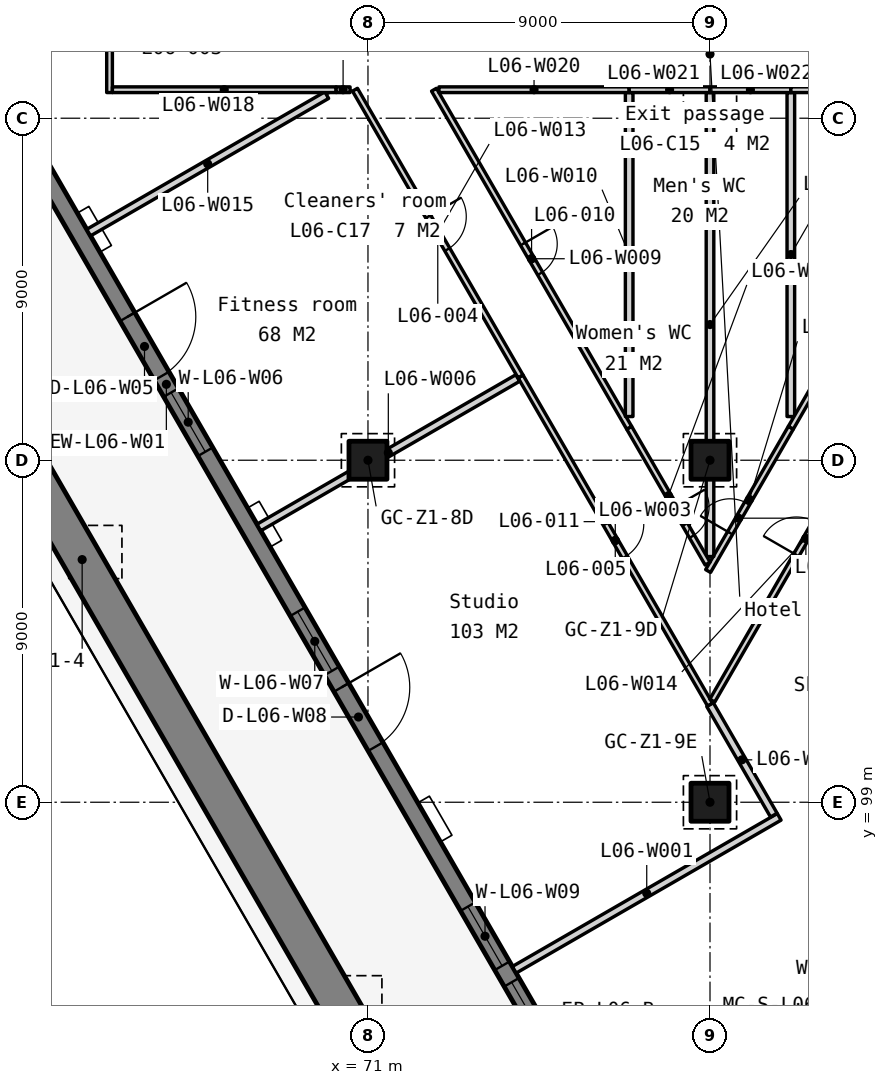
"""IFC4 building model, lengths in metres.
Left out: names, types, materials, properties, quantities, classifications, styles, units other than length and angle.
Written with IfcOpenShell. Run it as: python <this file> out.ifc"""

import sys

from ifc_helpers import new_model, si_unit, direction, frame, frame_2d, origin, origin_2d, place, context, subcontext, project, spatial, polyline, rectangle, outline, extrude, element, fill, save


model = new_model("IFC4")
c1 = context("Model", 3, precision=1e-05, world=origin(), true_north=direction((0.0, 1.0)))
c2 = subcontext(c1, "Body", "Model", "MODEL_VIEW")
j1 = project(units=[si_unit("LENGTHUNIT", "METRE"), si_unit("PLANEANGLEUNIT", "RADIAN")], contexts=[c1])
p1 = place(None, origin())
s1 = spatial("IfcSite", under=j1, at=p1, CompositionType="ELEMENT")
p2 = place(p1, origin())
s2 = spatial("IfcBuilding", under=s1, at=p2, CompositionType="ELEMENT")
p3 = place(p2, frame((0.0, 0.0, 35.0)))
s3 = spatial("IfcBuildingStorey", under=s2, at=p3, CompositionType="ELEMENT", Elevation=35.0)
for number, where, z_axis, x_axis in (
    (1, (71.0, 108.0, 0.0), (0.0, 0.0, 1.0), (1.0, 0.0, 0.0)),
    (2, (80.0, 99.0, 0.0), (0.0, 0.0, 1.0), (1.0, 0.0, 0.0)),
    (3, (80.0, 108.0, 0.0), (0.0, 0.0, 1.0), (1.0, 0.0, 0.0)),
):
    element("IfcColumn", number, at=place(p3, frame(where, z_axis=z_axis, x_axis=x_axis)), inside=s3, PredefinedType="COLUMN", context=c2, shape_type="SweptSolid", body=[
        extrude(rectangle(XDim=1.0, YDim=1.0, at=origin_2d()), origin(), (0.0, 0.0, 1.0), 3.5),
    ])
p4 = place(p3, frame((54.495, 129.397, -0.2), z_axis=(0.0, 0.0, 1.0), x_axis=(0.499999201451, -0.866025864826, 0.0)))
e4 = element("IfcWall", 4, at=p4, inside=s3, PredefinedType="SOLIDWALL", context=c2, shape_type="SweptSolid", body=[
    extrude(outline(polyline([(44.8, 0.0), (44.8, 3.55), (0.0, 3.55), (0.0, 0.0), (44.8, 0.0)])), frame((0.0, 0.225, 0.0), z_axis=(0.0, -1.0, 0.0), x_axis=(1.0, 0.0, 0.0)), (0.0, 0.0, 1.0), 0.45),
])
p5 = place(p4, frame((2.43, 0.0, 1.1)))
e5 = element("IfcOpeningElement", 5, at=p5, cuts=e4, PredefinedType="OPENING", context=c2, shape_type="SweptSolid", body=[
    extrude(rectangle(XDim=1.8, YDim=1.5, at=frame_2d((0.9, 0.75))), frame((0.0, 0.235, 0.0), z_axis=(0.0, -1.0, 0.0), x_axis=(1.0, 0.0, 0.0)), (0.0, 0.0, 1.0), 0.47),
])
p6 = place(p4, frame((4.73, 0.0, 0.2)))
e6 = element("IfcOpeningElement", 6, at=p6, cuts=e4, PredefinedType="OPENING", context=c2, shape_type="SweptSolid", body=[
    extrude(rectangle(XDim=1.8, YDim=2.4, at=frame_2d((0.9, 1.2))), frame((0.0, 0.235, 0.0), z_axis=(0.0, -1.0, 0.0), x_axis=(1.0, 0.0, 0.0)), (0.0, 0.0, 1.0), 0.47),
])
p7 = place(p4, frame((11.39, 0.0, 1.1)))
e7 = element("IfcOpeningElement", 7, at=p7, cuts=e4, PredefinedType="OPENING", context=c2, shape_type="SweptSolid", body=[
    extrude(rectangle(XDim=1.8, YDim=1.5, at=frame_2d((0.9, 0.75))), frame((0.0, 0.235, 0.0), z_axis=(0.0, -1.0, 0.0), x_axis=(1.0, 0.0, 0.0)), (0.0, 0.0, 1.0), 0.47),
])
p8 = place(p4, frame((13.69, 0.0, 1.1)))
e8 = element("IfcOpeningElement", 8, at=p8, cuts=e4, PredefinedType="OPENING", context=c2, shape_type="SweptSolid", body=[
    extrude(rectangle(XDim=1.8, YDim=1.5, at=frame_2d((0.9, 0.75))), frame((0.0, 0.235, 0.0), z_axis=(0.0, -1.0, 0.0), x_axis=(1.0, 0.0, 0.0)), (0.0, 0.0, 1.0), 0.47),
])
p9 = place(p4, frame((20.35, 0.0, 0.2)))
e9 = element("IfcOpeningElement", 9, at=p9, cuts=e4, PredefinedType="OPENING", context=c2, shape_type="SweptSolid", body=[
    extrude(rectangle(XDim=1.8, YDim=2.4, at=frame_2d((0.9, 1.2))), frame((0.0, 0.235, 0.0), z_axis=(0.0, -1.0, 0.0), x_axis=(1.0, 0.0, 0.0)), (0.0, 0.0, 1.0), 0.47),
])
p10 = place(p4, frame((22.65, 0.0, 1.1)))
e10 = element("IfcOpeningElement", 10, at=p10, cuts=e4, PredefinedType="OPENING", context=c2, shape_type="SweptSolid", body=[
    extrude(rectangle(XDim=1.8, YDim=1.5, at=frame_2d((0.9, 0.75))), frame((0.0, 0.235, 0.0), z_axis=(0.0, -1.0, 0.0), x_axis=(1.0, 0.0, 0.0)), (0.0, 0.0, 1.0), 0.47),
])
p11 = place(p4, frame((29.31, 0.0, 1.1)))
e11 = element("IfcOpeningElement", 11, at=p11, cuts=e4, PredefinedType="OPENING", context=c2, shape_type="SweptSolid", body=[
    extrude(rectangle(XDim=1.8, YDim=1.5, at=frame_2d((0.9, 0.75))), frame((0.0, 0.235, 0.0), z_axis=(0.0, -1.0, 0.0), x_axis=(1.0, 0.0, 0.0)), (0.0, 0.0, 1.0), 0.47),
])
p12 = place(p4, frame((31.61, 0.0, 0.2)))
e12 = element("IfcOpeningElement", 12, at=p12, cuts=e4, PredefinedType="OPENING", context=c2, shape_type="SweptSolid", body=[
    extrude(rectangle(XDim=1.8, YDim=2.4, at=frame_2d((0.9, 1.2))), frame((0.0, 0.235, 0.0), z_axis=(0.0, -1.0, 0.0), x_axis=(1.0, 0.0, 0.0)), (0.0, 0.0, 1.0), 0.47),
])
p13 = place(p4, frame((38.27, 0.0, 1.1)))
e13 = element("IfcOpeningElement", 13, at=p13, cuts=e4, PredefinedType="OPENING", context=c2, shape_type="SweptSolid", body=[
    extrude(rectangle(XDim=1.8, YDim=1.5, at=frame_2d((0.9, 0.75))), frame((0.0, 0.235, 0.0), z_axis=(0.0, -1.0, 0.0), x_axis=(1.0, 0.0, 0.0)), (0.0, 0.0, 1.0), 0.47),
])
p14 = place(p4, frame((40.57, 0.0, 1.1)))
e14 = element("IfcOpeningElement", 14, at=p14, cuts=e4, PredefinedType="OPENING", context=c2, shape_type="SweptSolid", body=[
    extrude(rectangle(XDim=1.8, YDim=1.5, at=frame_2d((0.9, 0.75))), frame((0.0, 0.235, 0.0), z_axis=(0.0, -1.0, 0.0), x_axis=(1.0, 0.0, 0.0)), (0.0, 0.0, 1.0), 0.47),
])
for number, where, z_axis, x_axis in (
    (15, (110.208, 129.091, 0.0), (0.0, 0.0, 1.0), (-0.5, -0.866, 0.0)),
    (16, (77.166, 81.679, 0.0), (0.0, 0.0, 1.0), (-0.5, 0.866, 0.0)),
):
    element("IfcWall", number, at=place(p3, frame(where, z_axis=z_axis, x_axis=x_axis)), inside=s3, PredefinedType="STANDARD", context=c2, shape_type="SweptSolid", body=[
        extrude(rectangle(XDim=54.747, YDim=1.0, at=frame_2d((27.374, 0.0))), origin(), (0.0, 0.0, 1.0), 0.6),
    ])
p15 = place(p3, frame((74.85, 94.591, 0.0), z_axis=(0.0, 0.0, 1.0), x_axis=(0.866034066097, 0.499984996134, 0.0)))
e17 = element("IfcWall", 17, at=p15, inside=s3, PredefinedType="PARTITIONING", context=c2, shape_type="SweptSolid", body=[
    extrude(rectangle(XDim=8.05, YDim=0.2, at=frame_2d((4.025, 0.0))), origin(), (0.0, 0.0, 1.0), 3.35),
])
p16 = place(p3, frame((80.0, 101.571, 0.0), z_axis=(0.0, 0.0, 1.0), x_axis=(0.499875544254, -0.86609724642, 0.0)))
e18 = element("IfcWall", 18, at=p16, inside=s3, PredefinedType="PARTITIONING", context=c2, shape_type="SweptSolid", body=[
    extrude(rectangle(XDim=3.359, YDim=0.2, at=frame_2d((1.68, 0.0))), origin(), (0.0, 0.0, 1.0), 3.35),
])
p17 = place(p3, frame((75.015, 110.206, 0.0), z_axis=(0.0, 0.0, 1.0), x_axis=(0.49999446006, -0.866028602246, 0.0)))
e19 = element("IfcWall", 19, at=p17, inside=s3, PredefinedType="PARTITIONING", context=c2, shape_type="SweptSolid", body=[
    extrude(rectangle(XDim=9.971, YDim=0.15, at=frame_2d((4.985, 0.0))), origin(), (0.0, 0.0, 1.0), 3.35),
])
p18 = place(p17, frame((4.485, 0.0, 0.0)))
e20 = element("IfcOpeningElement", 20, at=p18, cuts=e19, PredefinedType="OPENING", context=c2, shape_type="SweptSolid", body=[
    extrude(rectangle(XDim=1.0, YDim=2.1, at=frame_2d((0.5, 1.05))), frame((0.0, 0.085, 0.0), z_axis=(0.0, -1.0, 0.0), x_axis=(1.0, 0.0, 0.0)), (0.0, 0.0, 1.0), 0.17),
])
p19 = place(p3, frame((79.95, 105.084, 0.0), z_axis=(0.0, 0.0, 1.0), x_axis=(0.500016925002, 0.866015631909, 0.0)))
e21 = element("IfcWall", 21, at=p19, inside=s3, PredefinedType="PARTITIONING", context=c2, shape_type="SweptSolid", body=[
    extrude(rectangle(XDim=4.354, YDim=0.15, at=frame_2d((2.177, 0.0))), origin(), (0.0, 0.0, 1.0), 3.35),
])
p20 = place(p19, frame((1.156, 0.0, 0.0)))
e22 = element("IfcOpeningElement", 22, at=p20, cuts=e21, PredefinedType="OPENING", context=c2, shape_type="SweptSolid", body=[
    extrude(rectangle(XDim=0.9, YDim=2.1, at=frame_2d((0.45, 1.05))), frame((0.0, 0.085, 0.0), z_axis=(0.0, -1.0, 0.0), x_axis=(1.0, 0.0, 0.0)), (0.0, 0.0, 1.0), 0.17),
])
p21 = place(p3, frame((80.0, 105.466, 0.0), z_axis=(0.0, 0.0, 1.0), x_axis=(0.0, 1.0, 0.0)))
e23 = element("IfcWall", 23, at=p21, inside=s3, PredefinedType="PARTITIONING", context=c2, shape_type="SweptSolid", body=[
    extrude(rectangle(XDim=12.209, YDim=0.2, at=frame_2d((6.105, 0.0))), origin(), (0.0, 0.0, 1.0), 2.801),
])
p22 = place(p3, frame((68.13, 106.23, 0.0), z_axis=(0.0, 0.0, 1.0), x_axis=(0.866018618032, 0.500011753083, 0.0)))
e24 = element("IfcWall", 24, at=p22, inside=s3, PredefinedType="PARTITIONING", context=c2, shape_type="SweptSolid", body=[
    extrude(rectangle(XDim=7.865, YDim=0.2, at=frame_2d((3.933, 0.0))), origin(), (0.0, 0.0, 1.0), 3.35),
])
p23 = place(p3, frame((77.873, 108.854, 0.0), z_axis=(0.0, 0.0, 1.0), x_axis=(0.500005674609, -0.866022127522, 0.0)))
e25 = element("IfcWall", 25, at=p23, inside=s3, PredefinedType="PARTITIONING", context=c2, shape_type="SweptSolid", body=[
    extrude(rectangle(XDim=4.129, YDim=0.15, at=frame_2d((2.064, 0.0))), origin(), (0.0, 0.0, 1.0), 3.35),
])
p24 = place(p23, frame((2.403, 0.0, 0.0)))
e26 = element("IfcOpeningElement", 26, at=p24, cuts=e25, PredefinedType="OPENING", context=c2, shape_type="SweptSolid", body=[
    extrude(rectangle(XDim=0.9, YDim=2.1, at=frame_2d((0.45, 1.05))), frame((0.0, 0.085, 0.0), z_axis=(0.0, -1.0, 0.0), x_axis=(1.0, 0.0, 0.0)), (0.0, 0.0, 1.0), 0.17),
])
p25 = place(p3, frame((72.737, 117.75, 0.0), z_axis=(0.0, 0.0, 1.0), x_axis=(0.499994038704, -0.866028845513, 0.0)))
e27 = element("IfcWall", 27, at=p25, inside=s3, PredefinedType="PARTITIONING", context=c2, shape_type="SweptSolid", body=[
    extrude(rectangle(XDim=10.272, YDim=0.15, at=frame_2d((5.136, 0.0))), origin(), (0.0, 0.0, 1.0), 3.35),
])
p26 = place(p25, frame((4.686, 0.0, 0.0)))
e28 = element("IfcOpeningElement", 28, at=p26, cuts=e27, PredefinedType="OPENING", context=c2, shape_type="SweptSolid", body=[
    extrude(rectangle(XDim=0.9, YDim=2.1, at=frame_2d((0.45, 1.05))), frame((0.0, 0.085, 0.0), z_axis=(0.0, -1.0, 0.0), x_axis=(1.0, 0.0, 0.0)), (0.0, 0.0, 1.0), 0.17),
])
for number, where, z_axis, x_axis in (
    (29, (77.873, 109.15, 0.0), (0.0, 0.0, 1.0), (0.0, 1.0, 0.0)),
    (30, (82.127, 109.15, 0.0), (0.0, 0.0, 1.0), (0.0, 1.0, 0.0)),
):
    element("IfcWall", number, at=place(p3, frame(where, z_axis=z_axis, x_axis=x_axis)), inside=s3, PredefinedType="PARTITIONING", context=c2, shape_type="SweptSolid", body=[
        extrude(rectangle(XDim=8.525, YDim=0.2, at=frame_2d((4.263, 0.0))), origin(), (0.0, 0.0, 1.0), 3.35),
    ])
p27 = place(p3, frame((82.127, 108.854, 0.0), z_axis=(0.0, 0.0, 1.0), x_axis=(0.499994038704, 0.866028845513, 0.0)))
e31 = element("IfcWall", 31, at=p27, inside=s3, PredefinedType="PARTITIONING", context=c2, shape_type="SweptSolid", body=[
    extrude(rectangle(XDim=10.272, YDim=0.15, at=frame_2d((5.136, 0.0))), origin(), (0.0, 0.0, 1.0), 3.35),
])
p28 = place(p27, frame((4.686, 0.0, 0.0)))
e32 = element("IfcOpeningElement", 32, at=p28, cuts=e31, PredefinedType="OPENING", context=c2, shape_type="SweptSolid", body=[
    extrude(rectangle(XDim=0.9, YDim=2.1, at=frame_2d((0.45, 1.05))), frame((0.0, 0.085, 0.0), z_axis=(0.0, -1.0, 0.0), x_axis=(1.0, 0.0, 0.0)), (0.0, 0.0, 1.0), 0.17),
])
p29 = place(p3, frame((70.659, 117.75, 0.0), z_axis=(0.0, 0.0, 1.0), x_axis=(0.500015174863, -0.866016642396, 0.0)))
e33 = element("IfcWall", 33, at=p29, inside=s3, PredefinedType="PARTITIONING", context=c2, shape_type="SweptSolid", body=[
    extrude(rectangle(XDim=8.712, YDim=0.15, at=frame_2d((4.356, 0.0))), origin(), (0.0, 0.0, 1.0), 3.35),
])
p30 = place(p29, frame((3.856, 0.0, 0.0)))
e34 = element("IfcOpeningElement", 34, at=p30, cuts=e33, PredefinedType="OPENING", context=c2, shape_type="SweptSolid", body=[
    extrude(rectangle(XDim=1.0, YDim=2.1, at=frame_2d((0.5, 1.05))), frame((0.0, 0.085, 0.0), z_axis=(0.0, -1.0, 0.0), x_axis=(1.0, 0.0, 0.0)), (0.0, 0.0, 1.0), 0.17),
])
p31 = place(p3, frame((80.06, 101.675, 0.0), z_axis=(0.0, 0.0, 1.0), x_axis=(0.49999348569, 0.86602916479, 0.0)))
e35 = element("IfcWall", 35, at=p31, inside=s3, PredefinedType="PARTITIONING", context=c2, shape_type="SweptSolid", body=[
    extrude(rectangle(XDim=9.851, YDim=0.15, at=frame_2d((4.925, 0.0))), origin(), (0.0, 0.0, 1.0), 3.35),
])
p32 = place(p31, frame((4.425, 0.0, 0.0)))
e36 = element("IfcOpeningElement", 36, at=p32, cuts=e35, PredefinedType="OPENING", context=c2, shape_type="SweptSolid", body=[
    extrude(rectangle(XDim=1.0, YDim=2.1, at=frame_2d((0.5, 1.05))), frame((0.0, 0.085, 0.0), z_axis=(0.0, -1.0, 0.0), x_axis=(1.0, 0.0, 0.0)), (0.0, 0.0, 1.0), 0.17),
])
p33 = place(p3, frame((63.65, 113.99, 0.0), z_axis=(0.0, 0.0, 1.0), x_axis=(0.866027117883, 0.499997031082, 0.0)))
e37 = element("IfcWall", 37, at=p33, inside=s3, PredefinedType="PARTITIONING", context=c2, shape_type="SweptSolid", body=[
    extrude(rectangle(XDim=7.235, YDim=0.2, at=frame_2d((3.617, 0.0))), origin(), (0.0, 0.0, 1.0), 3.35),
])
p34 = place(p3, frame((64.2, 117.675, 0.0), z_axis=(0.0, 0.0, 1.0), x_axis=(0.0, 1.0, 0.0)))
e38 = element("IfcWall", 38, at=p34, inside=s3, PredefinedType="PARTITIONING", context=c2, shape_type="SweptSolid", body=[
    extrude(rectangle(XDim=8.9, YDim=0.15, at=frame_2d((4.45, 0.0))), origin(), (0.0, 0.0, 1.0), 3.35),
])
p35 = place(p34, frame((3.95, 0.0, 0.0)))
e39 = element("IfcOpeningElement", 39, at=p35, cuts=e38, PredefinedType="OPENING", context=c2, shape_type="SweptSolid", body=[
    extrude(rectangle(XDim=1.0, YDim=2.1, at=frame_2d((0.5, 1.05))), frame((0.0, 0.085, 0.0), z_axis=(0.0, -1.0, 0.0), x_axis=(1.0, 0.0, 0.0)), (0.0, 0.0, 1.0), 0.17),
])
p36 = place(p3, frame((64.275, 117.75, 0.0), z_axis=(0.0, 0.0, 1.0), x_axis=(1.0, 0.0, 0.0)))
e40 = element("IfcWall", 40, at=p36, inside=s3, PredefinedType="PARTITIONING", context=c2, shape_type="SweptSolid", body=[
    extrude(rectangle(XDim=5.887, YDim=0.15, at=frame_2d((2.944, 0.0))), origin(), (0.0, 0.0, 1.0), 3.35),
])
p37 = place(p3, frame((70.162, 117.75, 0.0), z_axis=(0.0, 0.0, 1.0), x_axis=(1.0, 0.0, 0.0)))
e41 = element("IfcWall", 41, at=p37, inside=s3, PredefinedType="PARTITIONING", context=c2, shape_type="SweptSolid", body=[
    extrude(rectangle(XDim=0.367, YDim=0.15, at=frame_2d((0.183, 0.0))), origin(), (0.0, 0.0, 1.0), 3.35),
])
p38 = place(p3, frame((72.867, 117.75, 0.0), z_axis=(0.0, 0.0, 1.0), x_axis=(1.0, 0.0, 0.0)))
e42 = element("IfcWall", 42, at=p38, inside=s3, PredefinedType="PARTITIONING", context=c2, shape_type="SweptSolid", body=[
    extrude(rectangle(XDim=5.006, YDim=0.15, at=frame_2d((2.503, 0.0))), origin(), (0.0, 0.0, 1.0), 3.35),
])
for number, where, z_axis, x_axis in (
    (43, (77.873, 117.75, 0.0), (0.0, 0.0, 1.0), (1.0, 0.0, 0.0)),
    (44, (80.0, 117.75, 0.0), (0.0, 0.0, 1.0), (1.0, 0.0, 0.0)),
):
    element("IfcWall", number, at=place(p3, frame(where, z_axis=z_axis, x_axis=x_axis)), inside=s3, PredefinedType="PARTITIONING", context=c2, shape_type="SweptSolid", body=[
        extrude(rectangle(XDim=2.127, YDim=0.15, at=frame_2d((1.063, 0.0))), origin(), (0.0, 0.0, 1.0), 3.35),
    ])
p39 = place(p3, frame((82.127, 117.75, 0.0), z_axis=(0.0, 0.0, 1.0), x_axis=(1.0, 0.0, 0.0)))
e45 = element("IfcWall", 45, at=p39, inside=s3, PredefinedType="PARTITIONING", context=c2, shape_type="SweptSolid", body=[
    extrude(rectangle(XDim=5.006, YDim=0.15, at=frame_2d((2.503, 0.0))), origin(), (0.0, 0.0, 1.0), 3.35),
])
p40 = place(p9, origin())
e46 = element("IfcDoor", 46, at=p40, inside=s3, OperationType="SINGLE_SWING_LEFT", PredefinedType="DOOR", context=c2, shape_type="SweptSolid", body=[
    extrude(rectangle(XDim=1.8, YDim=2.4, at=frame_2d((0.9, 1.2))), frame((0.0, 0.025, 0.0), z_axis=(0.0, -1.0, 0.0), x_axis=(1.0, 0.0, 0.0)), (0.0, 0.0, 1.0), 0.05),
])
fill(e9, e46)
p41 = place(p10, origin())
e47 = element("IfcWindow", 47, at=p41, inside=s3, PartitioningType="SINGLE_PANEL", PredefinedType="WINDOW", context=c2, shape_type="SweptSolid", body=[
    extrude(rectangle(XDim=1.8, YDim=1.5, at=frame_2d((0.9, 0.75))), frame((0.0, 0.03, 0.0), z_axis=(0.0, -1.0, 0.0), x_axis=(1.0, 0.0, 0.0)), (0.0, 0.0, 1.0), 0.06),
])
fill(e10, e47)
p42 = place(p11, origin())
e48 = element("IfcWindow", 48, at=p42, inside=s3, PartitioningType="SINGLE_PANEL", PredefinedType="WINDOW", context=c2, shape_type="SweptSolid", body=[
    extrude(rectangle(XDim=1.8, YDim=1.5, at=frame_2d((0.9, 0.75))), frame((0.0, 0.03, 0.0), z_axis=(0.0, -1.0, 0.0), x_axis=(1.0, 0.0, 0.0)), (0.0, 0.0, 1.0), 0.06),
])
fill(e11, e48)
p43 = place(p12, origin())
e49 = element("IfcDoor", 49, at=p43, inside=s3, OperationType="SINGLE_SWING_LEFT", PredefinedType="DOOR", context=c2, shape_type="SweptSolid", body=[
    extrude(rectangle(XDim=1.8, YDim=2.4, at=frame_2d((0.9, 1.2))), frame((0.0, 0.025, 0.0), z_axis=(0.0, -1.0, 0.0), x_axis=(1.0, 0.0, 0.0)), (0.0, 0.0, 1.0), 0.05),
])
fill(e12, e49)
p44 = place(p13, origin())
e50 = element("IfcWindow", 50, at=p44, inside=s3, PartitioningType="SINGLE_PANEL", PredefinedType="WINDOW", context=c2, shape_type="SweptSolid", body=[
    extrude(rectangle(XDim=1.8, YDim=1.5, at=frame_2d((0.9, 0.75))), frame((0.0, 0.03, 0.0), z_axis=(0.0, -1.0, 0.0), x_axis=(1.0, 0.0, 0.0)), (0.0, 0.0, 1.0), 0.06),
])
fill(e13, e50)
p45 = place(p14, origin())
e51 = element("IfcWindow", 51, at=p45, inside=s3, PartitioningType="SINGLE_PANEL", PredefinedType="WINDOW", context=c2, shape_type="SweptSolid", body=[
    extrude(rectangle(XDim=1.8, YDim=1.5, at=frame_2d((0.9, 0.75))), frame((0.0, 0.03, 0.0), z_axis=(0.0, -1.0, 0.0), x_axis=(1.0, 0.0, 0.0)), (0.0, 0.0, 1.0), 0.06),
])
fill(e14, e51)
p46 = place(p30, origin())
e52 = element("IfcDoor", 52, at=p46, inside=s3, OperationType="SINGLE_SWING_LEFT", PredefinedType="DOOR", context=c2, shape_type="SweptSolid", body=[
    extrude(rectangle(XDim=1.0, YDim=2.1, at=frame_2d((0.5, 1.05))), frame((0.0, 0.025, 0.0), z_axis=(0.0, -1.0, 0.0), x_axis=(1.0, 0.0, 0.0)), (0.0, 0.0, 1.0), 0.05),
])
fill(e34, e52)
p47 = place(p18, origin())
e53 = element("IfcDoor", 53, at=p47, inside=s3, OperationType="SINGLE_SWING_LEFT", PredefinedType="DOOR", context=c2, shape_type="SweptSolid", body=[
    extrude(rectangle(XDim=1.0, YDim=2.1, at=frame_2d((0.5, 1.05))), frame((0.0, 0.025, 0.0), z_axis=(0.0, -1.0, 0.0), x_axis=(1.0, 0.0, 0.0)), (0.0, 0.0, 1.0), 0.05),
])
fill(e20, e53)
p48 = place(p32, origin())
e54 = element("IfcDoor", 54, at=p48, inside=s3, OperationType="SINGLE_SWING_LEFT", PredefinedType="DOOR", context=c2, shape_type="SweptSolid", body=[
    extrude(rectangle(XDim=1.0, YDim=2.1, at=frame_2d((0.5, 1.05))), frame((0.0, 0.025, 0.0), z_axis=(0.0, -1.0, 0.0), x_axis=(1.0, 0.0, 0.0)), (0.0, 0.0, 1.0), 0.05),
])
fill(e36, e54)
p49 = place(p26, origin())
e55 = element("IfcDoor", 55, at=p49, inside=s3, OperationType="SINGLE_SWING_LEFT", PredefinedType="DOOR", context=c2, shape_type="SweptSolid", body=[
    extrude(rectangle(XDim=0.9, YDim=2.1, at=frame_2d((0.45, 1.05))), frame((0.0, 0.025, 0.0), z_axis=(0.0, -1.0, 0.0), x_axis=(1.0, 0.0, 0.0)), (0.0, 0.0, 1.0), 0.05),
])
fill(e28, e55)
p50 = place(p24, origin())
e56 = element("IfcDoor", 56, at=p50, inside=s3, OperationType="SINGLE_SWING_LEFT", PredefinedType="DOOR", context=c2, shape_type="SweptSolid", body=[
    extrude(rectangle(XDim=0.9, YDim=2.1, at=frame_2d((0.45, 1.05))), frame((0.0, 0.025, 0.0), z_axis=(0.0, -1.0, 0.0), x_axis=(1.0, 0.0, 0.0)), (0.0, 0.0, 1.0), 0.05),
])
fill(e26, e56)
p51 = place(p20, origin())
e57 = element("IfcDoor", 57, at=p51, inside=s3, OperationType="SINGLE_SWING_LEFT", PredefinedType="DOOR", context=c2, shape_type="SweptSolid", body=[
    extrude(rectangle(XDim=0.9, YDim=2.1, at=frame_2d((0.45, 1.05))), frame((0.0, 0.025, 0.0), z_axis=(0.0, -1.0, 0.0), x_axis=(1.0, 0.0, 0.0)), (0.0, 0.0, 1.0), 0.05),
])
fill(e22, e57)
save(model, sys.argv[1])
